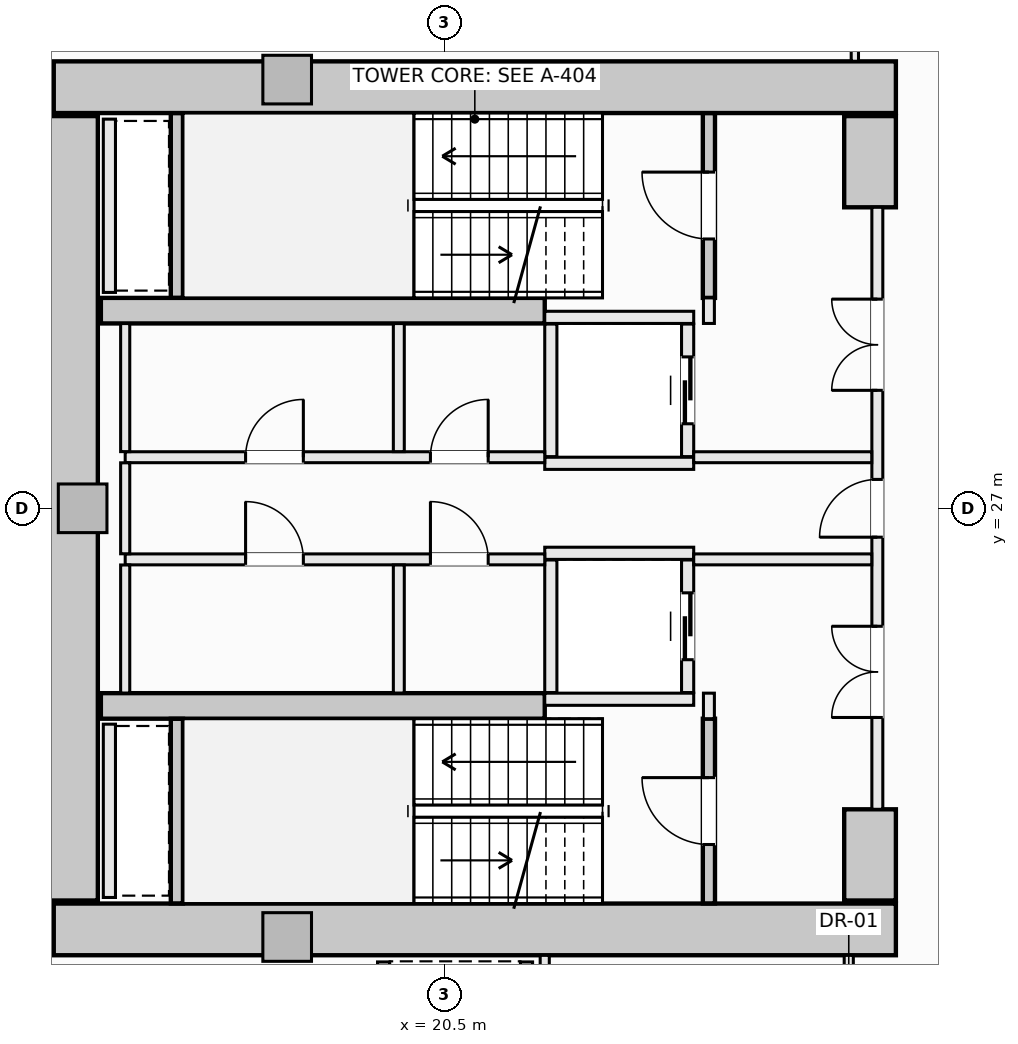
"""IFC4 building model, lengths in metres.
Left out: names, types, materials, properties, quantities, classifications, styles, units other than length and angle.
Written with IfcOpenShell. Run it as: python <this file> out.ifc"""

import sys

from ifc_helpers import new_model, si_unit, direction, frame, frame_2d, origin, origin_2d, place, context, subcontext, project, spatial, rectangle, extrude, element, fill, save


model = new_model("IFC4")
c1 = context("Model", 3, precision=1e-05, world=origin(), true_north=direction((0.0, 1.0)))
c2 = subcontext(c1, "Body", "Model", "MODEL_VIEW")
j1 = project(units=[si_unit("LENGTHUNIT", "METRE"), si_unit("PLANEANGLEUNIT", "RADIAN")], contexts=[c1])
p1 = place(None, origin())
s1 = spatial("IfcSite", under=j1, at=p1, CompositionType="ELEMENT")
p2 = place(p1, origin())
s2 = spatial("IfcBuilding", under=s1, at=p2, CompositionType="ELEMENT")
p3 = place(p2, frame((0.0, 0.0, 30.35)))
s3 = spatial("IfcBuildingStorey", under=s2, at=p3, CompositionType="ELEMENT", Elevation=30.35)
for number, where, z_axis, x_axis in (
    (1, (14.075, 33.925, -0.28), (0.0, 0.0, 1.0), (1.0, 0.0, 0.0)),
    (2, (14.075, 20.075, -0.28), (0.0, 0.0, 1.0), (1.0, 0.0, 0.0)),
):
    element("IfcWall", number, at=place(p3, frame(where, z_axis=z_axis, x_axis=x_axis)), inside=s3, PredefinedType="SHEAR", context=c2, shape_type="SweptSolid", body=[
        extrude(rectangle(XDim=13.85, YDim=0.85, at=frame_2d((6.925, 0.0))), origin(), (0.0, 0.0, 1.0), 3.85),
    ])
p4 = place(p3, frame((14.375, 20.55, -0.28), z_axis=(0.0, 0.0, 1.0), x_axis=(0.0, 1.0, 0.0)))
e3 = element("IfcWall", 3, at=p4, inside=s3, PredefinedType="SHEAR", context=c2, shape_type="SweptSolid", body=[
    extrude(rectangle(XDim=12.9, YDim=0.85, at=frame_2d((6.45, 0.0))), origin(), (0.0, 0.0, 1.0), 3.85),
])
for number, where, z_axis, x_axis in (
    (4, (27.5, 31.95, -0.28), (0.0, 0.0, 1.0), (0.0, 1.0, 0.0)),
    (5, (27.5, 20.55, -0.28), (0.0, 0.0, 1.0), (0.0, 1.0, 0.0)),
):
    element("IfcWall", number, at=place(p3, frame(where, z_axis=z_axis, x_axis=x_axis)), inside=s3, PredefinedType="SHEAR", context=c2, shape_type="SweptSolid", body=[
        extrude(rectangle(XDim=1.5, YDim=0.85, at=frame_2d((0.75, 0.0))), origin(), (0.0, 0.0, 1.0), 3.85),
    ])
for number, where, z_axis, x_axis in (
    (6, (14.85, 30.25, -0.28), (0.0, 0.0, 1.0), (1.0, 0.0, 0.0)),
    (7, (14.85, 23.75, -0.28), (0.0, 0.0, 1.0), (1.0, 0.0, 0.0)),
):
    element("IfcWall", number, at=place(p3, frame(where, z_axis=z_axis, x_axis=x_axis)), inside=s3, PredefinedType="SHEAR", context=c2, shape_type="SweptSolid", body=[
        extrude(rectangle(XDim=7.3, YDim=0.42, at=frame_2d((3.65, 0.0))), origin(), (0.0, 0.0, 1.0), 3.85),
    ])
for number, where, z_axis, x_axis in (
    (8, (17.914, 34.05, -0.28), (0.0, 0.0, 1.0), (1.0, 0.0, 0.0)),
    (9, (14.55, 27.0, -0.28), (0.0, 0.0, 1.0), (1.0, 0.0, 0.0)),
    (10, (17.914, 19.95, -0.28), (0.0, 0.0, 1.0), (1.0, 0.0, 0.0)),
):
    element("IfcColumn", number, at=place(p3, frame(where, z_axis=z_axis, x_axis=x_axis)), inside=s3, PredefinedType="PILASTER", context=c2, shape_type="SweptSolid", body=[
        extrude(rectangle(XDim=0.8, YDim=0.8, at=origin_2d()), origin(), (0.0, 0.0, 1.0), 3.85),
    ])
p5 = place(p3, frame((24.85, 30.46, -0.28), z_axis=(0.0, 0.0, 1.0), x_axis=(0.0, 1.0, 0.0)))
e11 = element("IfcWall", 11, at=p5, inside=s3, PredefinedType="SHEAR", context=c2, shape_type="SweptSolid", body=[
    extrude(rectangle(XDim=3.038, YDim=0.2, at=frame_2d((1.519, 0.0))), origin(), (0.0, 0.0, 1.0), 3.85),
])
p6 = place(p5, frame((0.969, 0.0, 0.28)))
e12 = element("IfcOpeningElement", 12, at=p6, cuts=e11, PredefinedType="OPENING", context=c2, shape_type="SweptSolid", body=[
    extrude(rectangle(XDim=1.1, YDim=2.15, at=frame_2d((0.55, 1.075))), frame((0.0, 0.11, 0.0), z_axis=(0.0, -1.0, 0.0), x_axis=(1.0, 0.0, 0.0)), (0.0, 0.0, 1.0), 0.22),
])
p7 = place(p3, frame((16.1, 30.462, -0.28), z_axis=(0.0, 0.0, 1.0), x_axis=(0.0, 1.0, 0.0)))
e13 = element("IfcWall", 13, at=p7, inside=s3, PredefinedType="SHEAR", context=c2, shape_type="SweptSolid", body=[
    extrude(rectangle(XDim=3.036, YDim=0.2, at=frame_2d((1.518, 0.0))), origin(), (0.0, 0.0, 1.0), 3.85),
])
p8 = place(p3, frame((24.85, 20.502, -0.28), z_axis=(0.0, 0.0, 1.0), x_axis=(0.0, 1.0, 0.0)))
e14 = element("IfcWall", 14, at=p8, inside=s3, PredefinedType="SHEAR", context=c2, shape_type="SweptSolid", body=[
    extrude(rectangle(XDim=3.038, YDim=0.2, at=frame_2d((1.519, 0.0))), origin(), (0.0, 0.0, 1.0), 3.85),
])
p9 = place(p8, frame((0.969, 0.0, 0.28)))
e15 = element("IfcOpeningElement", 15, at=p9, cuts=e14, PredefinedType="OPENING", context=c2, shape_type="SweptSolid", body=[
    extrude(rectangle(XDim=1.1, YDim=2.15, at=frame_2d((0.55, 1.075))), frame((0.0, 0.11, 0.0), z_axis=(0.0, -1.0, 0.0), x_axis=(1.0, 0.0, 0.0)), (0.0, 0.0, 1.0), 0.22),
])
p10 = place(p3, frame((16.1, 20.502, -0.28), z_axis=(0.0, 0.0, 1.0), x_axis=(0.0, 1.0, 0.0)))
e16 = element("IfcWall", 16, at=p10, inside=s3, PredefinedType="SHEAR", context=c2, shape_type="SweptSolid", body=[
    extrude(rectangle(XDim=3.036, YDim=0.2, at=frame_2d((1.518, 0.0))), origin(), (0.0, 0.0, 1.0), 3.85),
])
for number, where, z_axis, x_axis in (
    (17, (22.15, 30.14, 0.0), (0.0, 0.0, 1.0), (1.0, 0.0, 0.0)),
    (18, (22.15, 27.74, 0.0), (0.0, 0.0, 1.0), (1.0, 0.0, 0.0)),
):
    element("IfcWall", number, at=place(p3, frame(where, z_axis=z_axis, x_axis=x_axis)), inside=s3, PredefinedType="SOLIDWALL", context=c2, shape_type="SweptSolid", body=[
        extrude(rectangle(XDim=2.45, YDim=0.2, at=frame_2d((1.225, 0.0))), origin(), (0.0, 0.0, 1.0), 3.57),
    ])
p11 = place(p3, frame((22.25, 27.85, 0.0), z_axis=(0.0, 0.0, 1.0), x_axis=(0.0, 1.0, 0.0)))
e19 = element("IfcWall", 19, at=p11, inside=s3, PredefinedType="SOLIDWALL", context=c2, shape_type="SweptSolid", body=[
    extrude(rectangle(XDim=2.18, YDim=0.2, at=frame_2d((1.09, 0.0))), origin(), (0.0, 0.0, 1.0), 3.57),
])
p12 = place(p3, frame((24.5, 27.85, 0.0), z_axis=(0.0, 0.0, 1.0), x_axis=(0.0, 1.0, 0.0)))
e20 = element("IfcWall", 20, at=p12, inside=s3, PredefinedType="SOLIDWALL", context=c2, shape_type="SweptSolid", body=[
    extrude(rectangle(XDim=2.18, YDim=0.2, at=frame_2d((1.09, 0.0))), origin(), (0.0, 0.0, 1.0), 3.57),
])
p13 = place(p12, frame((0.54, 0.0, 0.0)))
e21 = element("IfcOpeningElement", 21, at=p13, cuts=e20, PredefinedType="OPENING", context=c2, shape_type="SweptSolid", body=[
    extrude(rectangle(XDim=1.1, YDim=2.2, at=frame_2d((0.55, 1.1))), frame((0.0, 0.11, 0.0), z_axis=(0.0, -1.0, 0.0), x_axis=(1.0, 0.0, 0.0)), (0.0, 0.0, 1.0), 0.22),
])
for number, where, z_axis, x_axis in (
    (22, (22.15, 26.26, 0.0), (0.0, 0.0, 1.0), (1.0, 0.0, 0.0)),
    (23, (22.15, 23.86, 0.0), (0.0, 0.0, 1.0), (1.0, 0.0, 0.0)),
):
    element("IfcWall", number, at=place(p3, frame(where, z_axis=z_axis, x_axis=x_axis)), inside=s3, PredefinedType="SOLIDWALL", context=c2, shape_type="SweptSolid", body=[
        extrude(rectangle(XDim=2.45, YDim=0.2, at=frame_2d((1.225, 0.0))), origin(), (0.0, 0.0, 1.0), 3.57),
    ])
p14 = place(p3, frame((22.25, 23.97, 0.0), z_axis=(0.0, 0.0, 1.0), x_axis=(0.0, 1.0, 0.0)))
e24 = element("IfcWall", 24, at=p14, inside=s3, PredefinedType="SOLIDWALL", context=c2, shape_type="SweptSolid", body=[
    extrude(rectangle(XDim=2.18, YDim=0.2, at=frame_2d((1.09, 0.0))), origin(), (0.0, 0.0, 1.0), 3.57),
])
p15 = place(p3, frame((24.5, 23.97, 0.0), z_axis=(0.0, 0.0, 1.0), x_axis=(0.0, 1.0, 0.0)))
e25 = element("IfcWall", 25, at=p15, inside=s3, PredefinedType="SOLIDWALL", context=c2, shape_type="SweptSolid", body=[
    extrude(rectangle(XDim=2.18, YDim=0.2, at=frame_2d((1.09, 0.0))), origin(), (0.0, 0.0, 1.0), 3.57),
])
p16 = place(p15, frame((0.54, 0.0, 0.0)))
e26 = element("IfcOpeningElement", 26, at=p16, cuts=e25, PredefinedType="OPENING", context=c2, shape_type="SweptSolid", body=[
    extrude(rectangle(XDim=1.1, YDim=2.2, at=frame_2d((0.55, 1.1))), frame((0.0, 0.11, 0.0), z_axis=(0.0, -1.0, 0.0), x_axis=(1.0, 0.0, 0.0)), (0.0, 0.0, 1.0), 0.22),
])
for number, where, z_axis, x_axis in (
    (27, (19.5, 17.01, 0.0), (0.0, 0.0, 1.0), (0.0, 1.0, 0.0)),
    (28, (21.85, 17.01, 0.0), (0.0, 0.0, 1.0), (0.0, 1.0, 0.0)),
):
    element("IfcWall", number, at=place(p3, frame(where, z_axis=z_axis, x_axis=x_axis)), inside=s3, PredefinedType="SOLIDWALL", context=c2, shape_type="SweptSolid", body=[
        extrude(rectangle(XDim=2.53, YDim=0.2, at=frame_2d((1.265, 0.0))), origin(), (0.0, 0.0, 1.0), 3.57),
    ])
for number, where, z_axis, x_axis in (
    (29, (14.99, 30.55, 0.0), (0.0, 0.0, 1.0), (0.0, 1.0, 0.0)),
    (30, (14.99, 20.6, 0.0), (0.0, 0.0, 1.0), (0.0, 1.0, 0.0)),
):
    element("IfcWall", number, at=place(p3, frame(where, z_axis=z_axis, x_axis=x_axis)), inside=s3, PredefinedType="SOLIDWALL", context=c2, shape_type="SweptSolid", body=[
        extrude(rectangle(XDim=2.85, YDim=0.2, at=frame_2d((1.425, 0.0))), origin(), (0.0, 0.0, 1.0), 3.57),
    ])
for number, where, z_axis, x_axis in (
    (31, (24.85, 23.54, 0.0), (0.0, 0.0, 1.0), (0.0, 1.0, 0.0)),
    (32, (24.85, 30.04, 0.0), (0.0, 0.0, 1.0), (0.0, 1.0, 0.0)),
):
    element("IfcWall", number, at=place(p3, frame(where, z_axis=z_axis, x_axis=x_axis)), inside=s3, PredefinedType="SOLIDWALL", context=c2, shape_type="SweptSolid", body=[
        extrude(rectangle(XDim=0.42, YDim=0.18, at=frame_2d((0.21, 0.0))), origin(), (0.0, 0.0, 1.0), 3.57),
    ])
p17 = place(p3, frame((27.62, 22.05, 0.0), z_axis=(0.0, 0.0, 1.0), x_axis=(0.0, 1.0, 0.0)))
e33 = element("IfcWall", 33, at=p17, inside=s3, PredefinedType="SOLIDWALL", context=c2, shape_type="SweptSolid", body=[
    extrude(rectangle(XDim=9.9, YDim=0.18, at=frame_2d((4.95, 0.0))), origin(), (0.0, 0.0, 1.0), 2.662),
])
p18 = place(p17, frame((4.475, 0.0, 0.0)))
e34 = element("IfcOpeningElement", 34, at=p18, cuts=e33, PredefinedType="OPENING", context=c2, shape_type="SweptSolid", body=[
    extrude(rectangle(XDim=0.95, YDim=2.1, at=frame_2d((0.475, 1.05))), frame((0.0, 0.1, 0.0), z_axis=(0.0, -1.0, 0.0), x_axis=(1.0, 0.0, 0.0)), (0.0, 0.0, 1.0), 0.2),
])
p19 = place(p17, frame((6.89, 0.0, 0.0)))
e35 = element("IfcOpeningElement", 35, at=p19, cuts=e33, PredefinedType="OPENING", context=c2, shape_type="SweptSolid", body=[
    extrude(rectangle(XDim=1.5, YDim=2.2, at=frame_2d((0.75, 1.1))), frame((0.0, 0.1, 0.0), z_axis=(0.0, -1.0, 0.0), x_axis=(1.0, 0.0, 0.0)), (0.0, 0.0, 1.0), 0.2),
])
p20 = place(p17, frame((1.51, 0.0, 0.0)))
e36 = element("IfcOpeningElement", 36, at=p20, cuts=e33, PredefinedType="OPENING", context=c2, shape_type="SweptSolid", body=[
    extrude(rectangle(XDim=1.5, YDim=2.2, at=frame_2d((0.75, 1.1))), frame((0.0, 0.1, 0.0), z_axis=(0.0, -1.0, 0.0), x_axis=(1.0, 0.0, 0.0)), (0.0, 0.0, 1.0), 0.2),
])
p21 = place(p3, frame((15.25, 27.84, 0.0), z_axis=(0.0, 0.0, 1.0), x_axis=(1.0, 0.0, 0.0)))
e37 = element("IfcWall", 37, at=p21, inside=s3, PredefinedType="SOLIDWALL", context=c2, shape_type="SweptSolid", body=[
    extrude(rectangle(XDim=6.9, YDim=0.18, at=frame_2d((3.45, 0.0))), origin(), (0.0, 0.0, 1.0), 3.57),
])
p22 = place(p21, frame((5.02, 0.0, 0.0)))
e38 = element("IfcOpeningElement", 38, at=p22, cuts=e37, PredefinedType="OPENING", context=c2, shape_type="SweptSolid", body=[
    extrude(rectangle(XDim=0.95, YDim=2.1, at=frame_2d((0.475, 1.05))), frame((0.0, 0.1, 0.0), z_axis=(0.0, -1.0, 0.0), x_axis=(1.0, 0.0, 0.0)), (0.0, 0.0, 1.0), 0.2),
])
p23 = place(p21, frame((1.98, 0.0, 0.0)))
e39 = element("IfcOpeningElement", 39, at=p23, cuts=e37, PredefinedType="OPENING", context=c2, shape_type="SweptSolid", body=[
    extrude(rectangle(XDim=0.95, YDim=2.1, at=frame_2d((0.475, 1.05))), frame((0.0, 0.1, 0.0), z_axis=(0.0, -1.0, 0.0), x_axis=(1.0, 0.0, 0.0)), (0.0, 0.0, 1.0), 0.2),
])
p24 = place(p3, frame((24.6, 27.84, 0.0), z_axis=(0.0, 0.0, 1.0), x_axis=(1.0, 0.0, 0.0)))
e40 = element("IfcWall", 40, at=p24, inside=s3, PredefinedType="SOLIDWALL", context=c2, shape_type="SweptSolid", body=[
    extrude(rectangle(XDim=2.928, YDim=0.18, at=frame_2d((1.464, 0.0))), origin(), (0.0, 0.0, 1.0), 3.57),
])
p25 = place(p3, frame((15.25, 26.16, 0.0), z_axis=(0.0, 0.0, 1.0), x_axis=(1.0, 0.0, 0.0)))
e41 = element("IfcWall", 41, at=p25, inside=s3, PredefinedType="SOLIDWALL", context=c2, shape_type="SweptSolid", body=[
    extrude(rectangle(XDim=6.9, YDim=0.18, at=frame_2d((3.45, 0.0))), origin(), (0.0, 0.0, 1.0), 3.57),
])
p26 = place(p25, frame((5.02, 0.0, 0.0)))
e42 = element("IfcOpeningElement", 42, at=p26, cuts=e41, PredefinedType="OPENING", context=c2, shape_type="SweptSolid", body=[
    extrude(rectangle(XDim=0.95, YDim=2.1, at=frame_2d((0.475, 1.05))), frame((0.0, 0.1, 0.0), z_axis=(0.0, -1.0, 0.0), x_axis=(1.0, 0.0, 0.0)), (0.0, 0.0, 1.0), 0.2),
])
p27 = place(p25, frame((1.98, 0.0, 0.0)))
e43 = element("IfcOpeningElement", 43, at=p27, cuts=e41, PredefinedType="OPENING", context=c2, shape_type="SweptSolid", body=[
    extrude(rectangle(XDim=0.95, YDim=2.1, at=frame_2d((0.475, 1.05))), frame((0.0, 0.1, 0.0), z_axis=(0.0, -1.0, 0.0), x_axis=(1.0, 0.0, 0.0)), (0.0, 0.0, 1.0), 0.2),
])
p28 = place(p3, frame((24.6, 26.16, 0.0), z_axis=(0.0, 0.0, 1.0), x_axis=(1.0, 0.0, 0.0)))
e44 = element("IfcWall", 44, at=p28, inside=s3, PredefinedType="SOLIDWALL", context=c2, shape_type="SweptSolid", body=[
    extrude(rectangle(XDim=2.928, YDim=0.18, at=frame_2d((1.464, 0.0))), origin(), (0.0, 0.0, 1.0), 3.57),
])
p29 = place(p3, frame((15.25, 23.962, 0.0), z_axis=(0.0, 0.0, 1.0), x_axis=(0.0, 1.0, 0.0)))
e45 = element("IfcWall", 45, at=p29, inside=s3, PredefinedType="PARTITIONING", context=c2, shape_type="SweptSolid", body=[
    extrude(rectangle(XDim=2.106, YDim=0.15, at=frame_2d((1.053, 0.0))), origin(), (0.0, 0.0, 1.0), 3.57),
])
p30 = place(p3, frame((15.25, 26.252, 0.0), z_axis=(0.0, 0.0, 1.0), x_axis=(0.0, 1.0, 0.0)))
e46 = element("IfcWall", 46, at=p30, inside=s3, PredefinedType="PARTITIONING", context=c2, shape_type="SweptSolid", body=[
    extrude(rectangle(XDim=1.496, YDim=0.15, at=frame_2d((0.748, 0.0))), origin(), (0.0, 0.0, 1.0), 3.57),
])
p31 = place(p3, frame((15.25, 27.932, 0.0), z_axis=(0.0, 0.0, 1.0), x_axis=(0.0, 1.0, 0.0)))
e47 = element("IfcWall", 47, at=p31, inside=s3, PredefinedType="PARTITIONING", context=c2, shape_type="SweptSolid", body=[
    extrude(rectangle(XDim=2.106, YDim=0.15, at=frame_2d((1.053, 0.0))), origin(), (0.0, 0.0, 1.0), 3.57),
])
for number, where, z_axis, x_axis in (
    (48, (19.75, 23.962, 0.0), (0.0, 0.0, 1.0), (0.0, 1.0, 0.0)),
    (49, (19.75, 27.932, 0.0), (0.0, 0.0, 1.0), (0.0, 1.0, 0.0)),
):
    element("IfcWall", number, at=place(p3, frame(where, z_axis=z_axis, x_axis=x_axis)), inside=s3, PredefinedType="SOLIDWALL", context=c2, shape_type="SweptSolid", body=[
        extrude(rectangle(XDim=2.106, YDim=0.18, at=frame_2d((1.053, 0.0))), origin(), (0.0, 0.0, 1.0), 3.57),
    ])
p32 = place(p3, frame((22.15, 17.127, 0.0), z_axis=(0.0, 0.0, 1.0), x_axis=(0.0, 1.0, 0.0)))
e50 = element("IfcWall", 50, at=p32, inside=s3, PredefinedType="PARTITIONING", context=c2, shape_type="SweptSolid", body=[
    extrude(rectangle(XDim=2.521, YDim=0.15, at=frame_2d((1.26, 0.0))), origin(), (0.0, 0.0, 1.0), 3.57),
])
p33 = place(p3, frame((27.15, 17.127, 0.0), z_axis=(0.0, 0.0, 1.0), x_axis=(0.0, 1.0, 0.0)))
e51 = element("IfcWall", 51, at=p33, inside=s3, PredefinedType="PARTITIONING", context=c2, shape_type="SweptSolid", body=[
    extrude(rectangle(XDim=2.521, YDim=0.15, at=frame_2d((1.26, 0.0))), origin(), (0.0, 0.0, 1.0), 3.57),
])
p34 = place(p33, frame((0.785, 0.0, 0.0)))
e52 = element("IfcOpeningElement", 52, at=p34, cuts=e51, PredefinedType="OPENING", context=c2, shape_type="SweptSolid", body=[
    extrude(rectangle(XDim=0.95, YDim=2.1, at=frame_2d((0.475, 1.05))), frame((0.0, 0.085, 0.0), z_axis=(0.0, -1.0, 0.0), x_axis=(1.0, 0.0, 0.0)), (0.0, 0.0, 1.0), 0.17),
])
p35 = place(p3, frame((27.25, 34.352, 0.0), z_axis=(0.0, 0.0, 1.0), x_axis=(0.0, 1.0, 0.0)))
e53 = element("IfcWall", 53, at=p35, inside=s3, PredefinedType="PARTITIONING", context=c2, shape_type="SweptSolid", body=[
    extrude(rectangle(XDim=0.606, YDim=0.12, at=frame_2d((0.303, 0.0))), origin(), (0.0, 0.0, 1.0), 3.57),
])
p36 = place(p3, frame((3.491, 20.478, 0.0), z_axis=(0.0, 0.0, 1.0), x_axis=(0.954372143903, -0.298619843517, 0.0)))
e54 = element("IfcWall", 54, at=p36, inside=s3, PredefinedType="PARTITIONING", context=c2, shape_type="SweptSolid", body=[
    extrude(rectangle(XDim=24.709, YDim=0.12, at=frame_2d((12.354, 0.0))), origin(), (0.0, 0.0, 1.0), 3.205),
])
p37 = place(p36, frame((6.594, 0.0, 0.0)))
e55 = element("IfcOpeningElement", 55, at=p37, cuts=e54, PredefinedType="OPENING", context=c2, shape_type="SweptSolid", body=[
    extrude(rectangle(XDim=0.95, YDim=2.1, at=frame_2d((0.475, 1.05))), frame((0.0, 0.07, 0.0), z_axis=(0.0, -1.0, 0.0), x_axis=(1.0, 0.0, 0.0)), (0.0, 0.0, 1.0), 0.14),
])
p38 = place(p6, origin())
e56 = element("IfcDoor", 56, at=p38, inside=s3, OperationType="SINGLE_SWING_RIGHT", PredefinedType="DOOR", context=c2, shape_type="SweptSolid", body=[
    extrude(rectangle(XDim=1.1, YDim=2.15, at=frame_2d((0.55, 1.075))), frame((0.0, 0.025, 0.0), z_axis=(0.0, -1.0, 0.0), x_axis=(1.0, 0.0, 0.0)), (0.0, 0.0, 1.0), 0.05),
])
fill(e12, e56)
p39 = place(p9, origin())
e57 = element("IfcDoor", 57, at=p39, inside=s3, OperationType="SINGLE_SWING_RIGHT", PredefinedType="DOOR", context=c2, shape_type="SweptSolid", body=[
    extrude(rectangle(XDim=1.1, YDim=2.15, at=frame_2d((0.55, 1.075))), frame((0.0, 0.025, 0.0), z_axis=(0.0, -1.0, 0.0), x_axis=(1.0, 0.0, 0.0)), (0.0, 0.0, 1.0), 0.05),
])
fill(e15, e57)
p40 = place(p13, origin())
e58 = element("IfcDoor", 58, at=p40, inside=s3, OperationType="SLIDING_TO_LEFT", PredefinedType="DOOR", context=c2, shape_type="SweptSolid", body=[
    extrude(rectangle(XDim=1.1, YDim=2.2, at=frame_2d((0.55, 1.1))), frame((0.0, 0.025, 0.0), z_axis=(0.0, -1.0, 0.0), x_axis=(1.0, 0.0, 0.0)), (0.0, 0.0, 1.0), 0.05),
])
fill(e21, e58)
p41 = place(p16, origin())
e59 = element("IfcDoor", 59, at=p41, inside=s3, OperationType="SLIDING_TO_LEFT", PredefinedType="DOOR", context=c2, shape_type="SweptSolid", body=[
    extrude(rectangle(XDim=1.1, YDim=2.2, at=frame_2d((0.55, 1.1))), frame((0.0, 0.025, 0.0), z_axis=(0.0, -1.0, 0.0), x_axis=(1.0, 0.0, 0.0)), (0.0, 0.0, 1.0), 0.05),
])
fill(e26, e59)
p42 = place(p18, origin())
e60 = element("IfcDoor", 60, at=p42, inside=s3, OperationType="SINGLE_SWING_LEFT", PredefinedType="DOOR", context=c2, shape_type="SweptSolid", body=[
    extrude(rectangle(XDim=0.95, YDim=2.1, at=frame_2d((0.475, 1.05))), frame((0.0, 0.025, 0.0), z_axis=(0.0, -1.0, 0.0), x_axis=(1.0, 0.0, 0.0)), (0.0, 0.0, 1.0), 0.05),
])
fill(e34, e60)
p43 = place(p19, origin())
e61 = element("IfcDoor", 61, at=p43, inside=s3, OperationType="DOUBLE_DOOR_SINGLE_SWING", PredefinedType="DOOR", context=c2, shape_type="SweptSolid", body=[
    extrude(rectangle(XDim=1.5, YDim=2.2, at=frame_2d((0.75, 1.1))), frame((0.0, 0.025, 0.0), z_axis=(0.0, -1.0, 0.0), x_axis=(1.0, 0.0, 0.0)), (0.0, 0.0, 1.0), 0.05),
])
fill(e35, e61)
p44 = place(p20, origin())
e62 = element("IfcDoor", 62, at=p44, inside=s3, OperationType="DOUBLE_DOOR_SINGLE_SWING", PredefinedType="DOOR", context=c2, shape_type="SweptSolid", body=[
    extrude(rectangle(XDim=1.5, YDim=2.2, at=frame_2d((0.75, 1.1))), frame((0.0, 0.025, 0.0), z_axis=(0.0, -1.0, 0.0), x_axis=(1.0, 0.0, 0.0)), (0.0, 0.0, 1.0), 0.05),
])
fill(e36, e62)
p45 = place(p22, origin())
e63 = element("IfcDoor", 63, at=p45, inside=s3, OperationType="SINGLE_SWING_RIGHT", PredefinedType="DOOR", context=c2, shape_type="SweptSolid", body=[
    extrude(rectangle(XDim=0.95, YDim=2.1, at=frame_2d((0.475, 1.05))), frame((0.0, 0.025, 0.0), z_axis=(0.0, -1.0, 0.0), x_axis=(1.0, 0.0, 0.0)), (0.0, 0.0, 1.0), 0.05),
])
fill(e38, e63)
p46 = place(p26, origin())
e64 = element("IfcDoor", 64, at=p46, inside=s3, OperationType="SINGLE_SWING_LEFT", PredefinedType="DOOR", context=c2, shape_type="SweptSolid", body=[
    extrude(rectangle(XDim=0.95, YDim=2.1, at=frame_2d((0.475, 1.05))), frame((0.0, 0.025, 0.0), z_axis=(0.0, -1.0, 0.0), x_axis=(1.0, 0.0, 0.0)), (0.0, 0.0, 1.0), 0.05),
])
fill(e42, e64)
p47 = place(p23, origin())
e65 = element("IfcDoor", 65, at=p47, inside=s3, OperationType="SINGLE_SWING_RIGHT", PredefinedType="DOOR", context=c2, shape_type="SweptSolid", body=[
    extrude(rectangle(XDim=0.95, YDim=2.1, at=frame_2d((0.475, 1.05))), frame((0.0, 0.025, 0.0), z_axis=(0.0, -1.0, 0.0), x_axis=(1.0, 0.0, 0.0)), (0.0, 0.0, 1.0), 0.05),
])
fill(e39, e65)
p48 = place(p27, origin())
e66 = element("IfcDoor", 66, at=p48, inside=s3, OperationType="SINGLE_SWING_LEFT", PredefinedType="DOOR", context=c2, shape_type="SweptSolid", body=[
    extrude(rectangle(XDim=0.95, YDim=2.1, at=frame_2d((0.475, 1.05))), frame((0.0, 0.025, 0.0), z_axis=(0.0, -1.0, 0.0), x_axis=(1.0, 0.0, 0.0)), (0.0, 0.0, 1.0), 0.05),
])
fill(e43, e66)
save(model, sys.argv[1])
